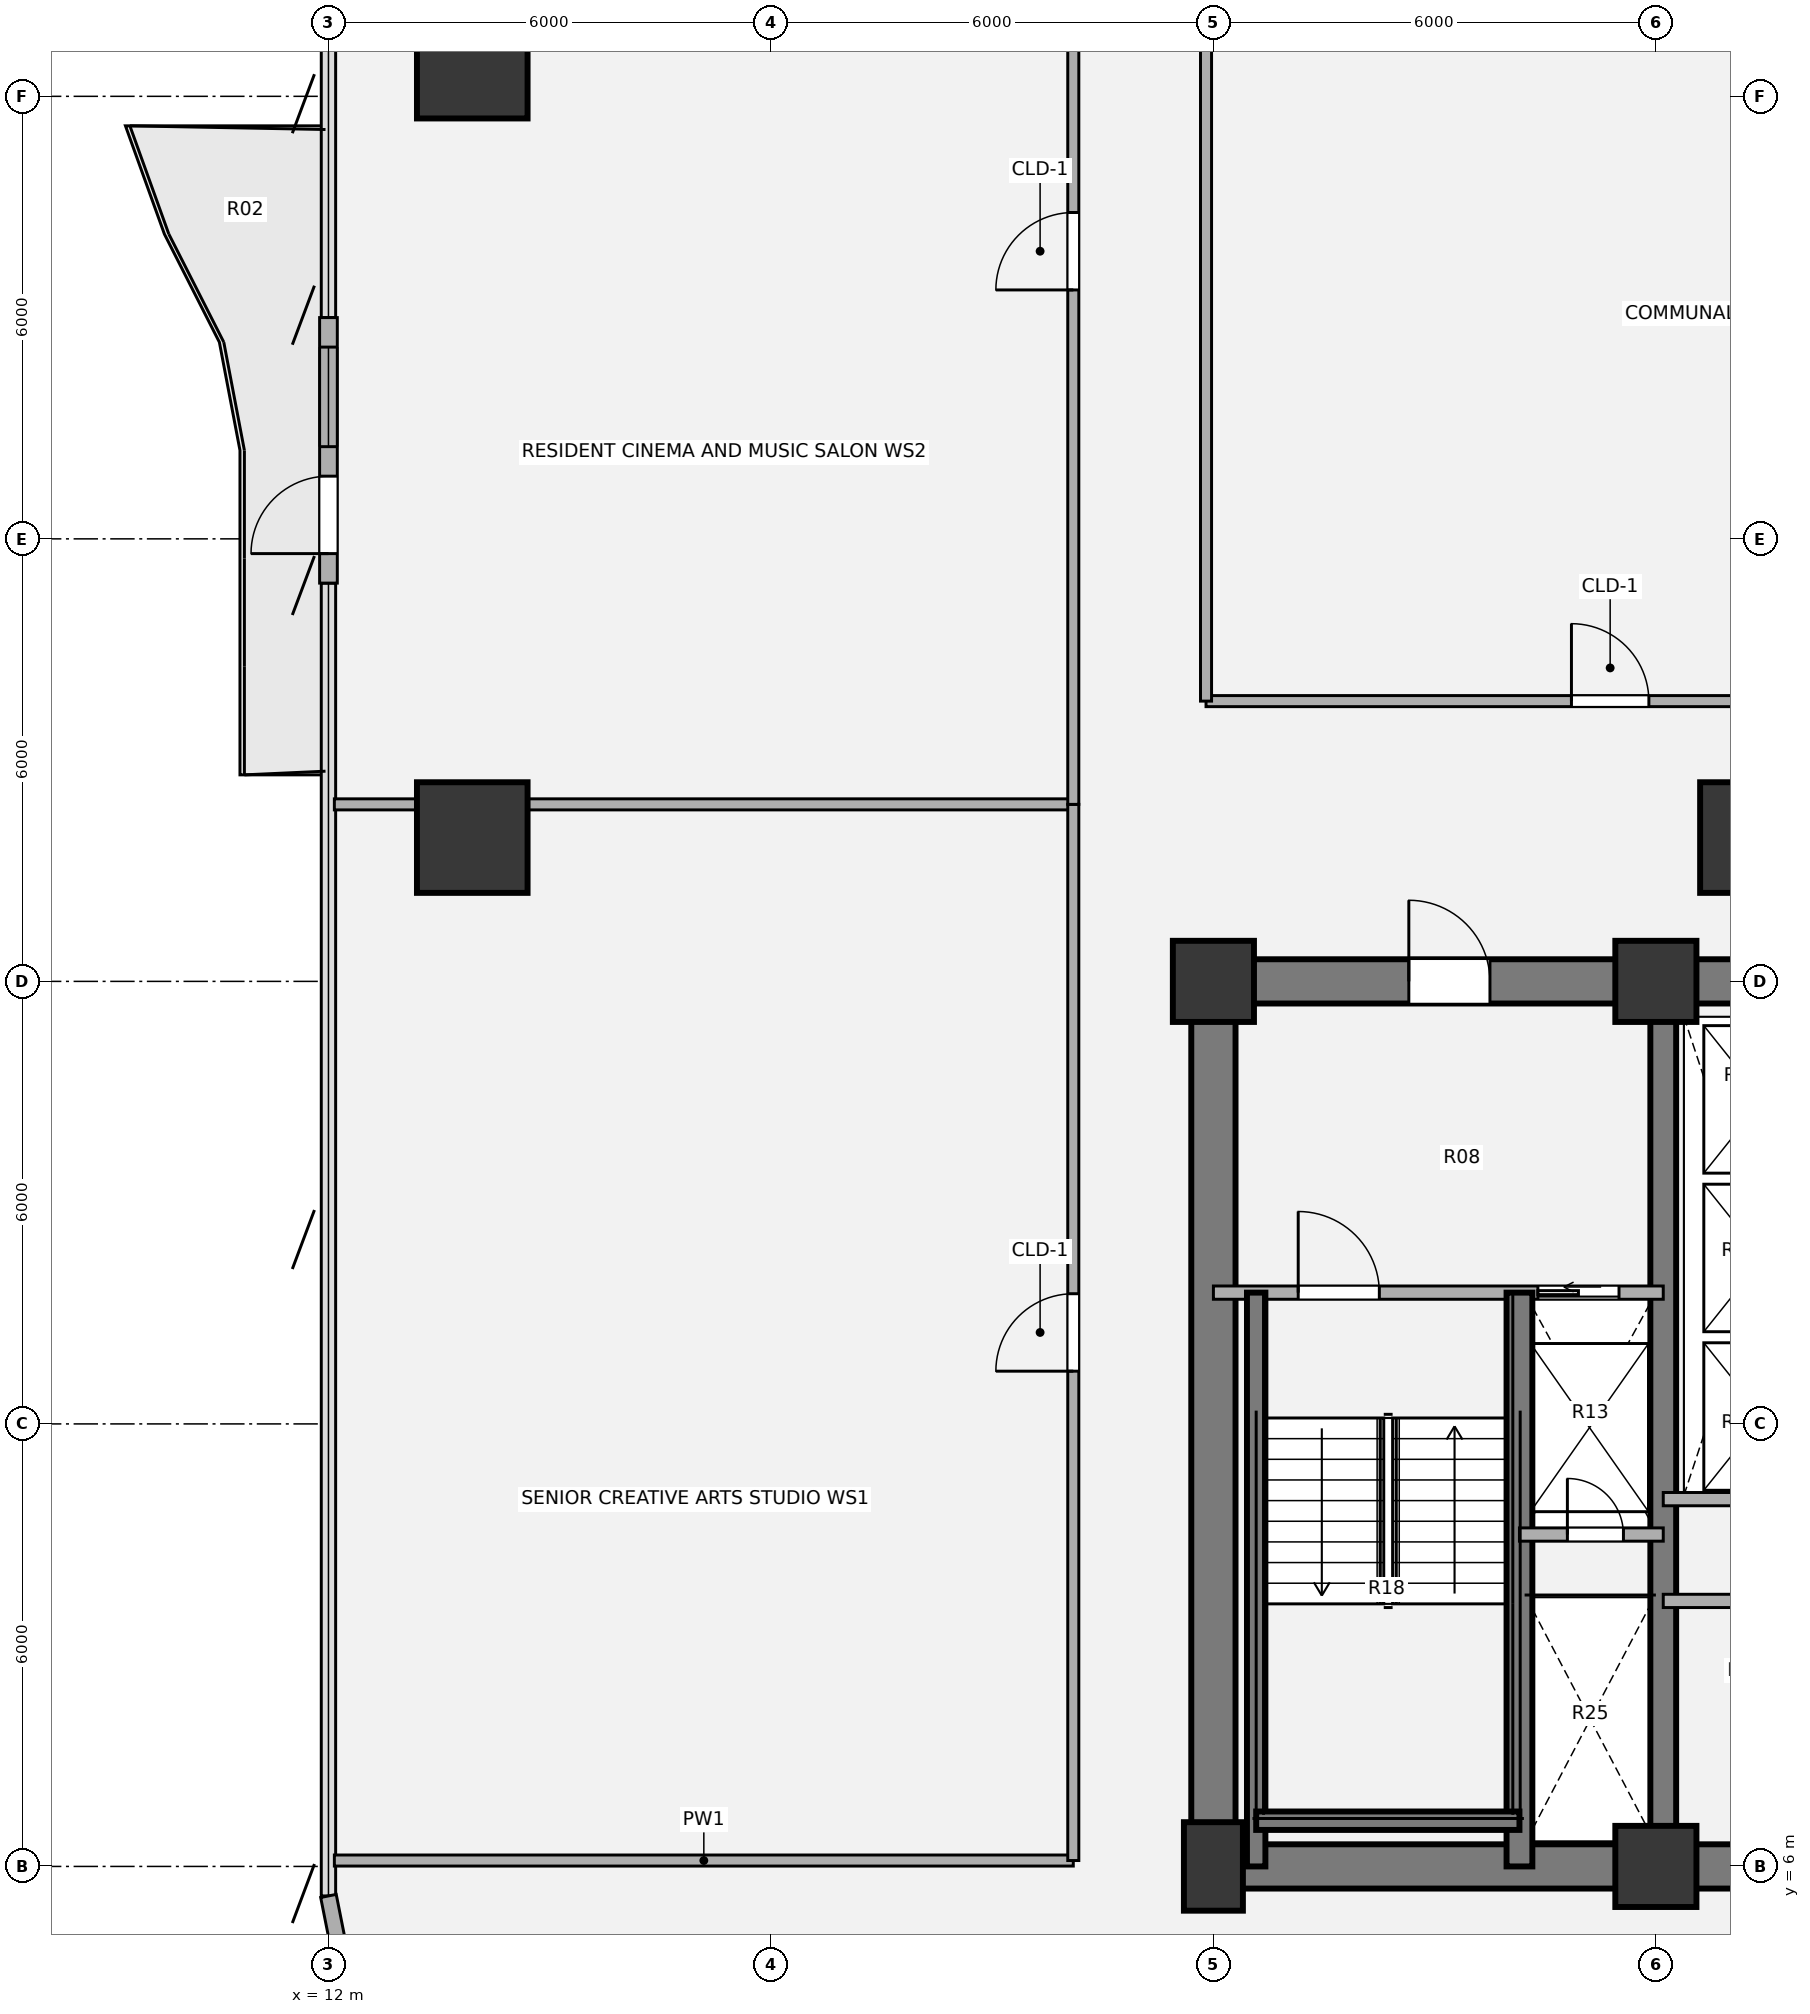
"""IFC4 building model, lengths in metres.
Left out: names, types, materials, properties, quantities, classifications, styles, units other than length and angle.
Written with IfcOpenShell. Run it as: python <this file> out.ifc"""

import sys

from ifc_helpers import new_model, si_unit, direction, frame, frame_2d, origin, origin_2d, place, context, subcontext, project, spatial, rectangle, hollow_circle, extrude, source, transform, mapped, element, fill, save


model = new_model("IFC4")
c1 = context("Model", 3, precision=1e-05, world=origin(), true_north=direction((0.0, 1.0)))
c2 = subcontext(c1, "Body", "Model", "MODEL_VIEW")
j1 = project(units=[si_unit("LENGTHUNIT", "METRE"), si_unit("PLANEANGLEUNIT", "RADIAN")], contexts=[c1])
p1 = place(None, origin())
s1 = spatial("IfcSite", under=j1, at=p1, CompositionType="ELEMENT")
p2 = place(p1, origin())
s2 = spatial("IfcBuilding", under=s1, at=p2, CompositionType="ELEMENT")
p3 = place(p2, frame((0.0, 0.0, 61.02)))
s3 = spatial("IfcBuildingStorey", under=s2, at=p3, CompositionType="ELEMENT", Elevation=61.02)
m1 = source(origin(), c2, "Body", "SweptSolid", [
    extrude(rectangle(XDim=0.8, YDim=1.2, at=origin_2d()), origin(), (0.0, 0.0, 1.0), 3.78),
])
p4 = place(p3, frame((24.0, 6.0, 0.0), z_axis=(0.0, 0.0, 1.0), x_axis=(1.0, 0.0, 0.0)))
e1 = element("IfcColumn", 1, at=p4, inside=s3, PredefinedType="COLUMN", context=c2, shape_type="MappedRepresentation", body=[
    mapped(m1, transform((0.0, 0.0, 0.0), x_axis=(1.0, 0.0, 0.0), y_axis=(0.0, 1.0, 0.0), z_axis=(0.0, 0.0, 1.0), scale=1.0)),
])
m2 = source(origin(), c2, "Body", "SweptSolid", [
    extrude(rectangle(XDim=1.1, YDim=1.1, at=origin_2d()), origin(), (0.0, 0.0, 1.0), 3.78),
])
for number, where, z_axis, x_axis in (
    (2, (30.0, 6.0, 0.0), (0.0, 0.0, 1.0), (1.0, 0.0, 0.0)),
    (3, (24.0, 18.0, 0.0), (0.0, 0.0, 1.0), (1.0, 0.0, 0.0)),
    (4, (30.0, 18.0, 0.0), (0.0, 0.0, 1.0), (1.0, 0.0, 0.0)),
):
    element("IfcColumn", number, at=place(p3, frame(where, z_axis=z_axis, x_axis=x_axis)), inside=s3, PredefinedType="COLUMN", context=c2, shape_type="MappedRepresentation", body=[
        mapped(m2, transform((0.0, 0.0, 0.0), x_axis=(1.0, 0.0, 0.0), y_axis=(0.0, 1.0, 0.0), z_axis=(0.0, 0.0, 1.0), scale=1.0)),
    ])
p5 = place(p3, frame((48.3, 6.0, 0.0), z_axis=(0.0, 0.0, 1.0), x_axis=(-1.0, 0.0, 0.0)))
e5 = element("IfcWall", 5, at=p5, inside=s3, PredefinedType="SHEAR", context=c2, shape_type="SweptSolid", body=[
    extrude(rectangle(XDim=24.6, YDim=0.6, at=frame_2d((12.3, 0.0))), origin(), (0.0, 0.0, 1.0), 3.78),
])
p6 = place(p3, frame((24.0, 6.0, 0.0), z_axis=(0.0, 0.0, 1.0), x_axis=(0.0, 1.0, 0.0)))
e6 = element("IfcWall", 6, at=p6, inside=s3, PredefinedType="SHEAR", context=c2, shape_type="SweptSolid", body=[
    extrude(rectangle(XDim=12.0, YDim=0.6, at=frame_2d((6.0, 0.0))), origin(), (0.0, 0.0, 1.0), 3.78),
])
p7 = place(p3, frame((23.7, 18.0, 0.0), z_axis=(0.0, 0.0, 1.0), x_axis=(1.0, 0.0, 0.0)))
e7 = element("IfcWall", 7, at=p7, inside=s3, PredefinedType="SHEAR", context=c2, shape_type="SweptSolid", body=[
    extrude(rectangle(XDim=9.5, YDim=0.6, at=frame_2d((4.75, 0.0))), origin(), (0.0, 0.0, 1.0), 3.78),
])
p8 = place(p7, frame((2.95, 0.0, 0.0)))
e8 = element("IfcOpeningElement", 8, at=p8, cuts=e7, PredefinedType="OPENING", context=c2, shape_type="SweptSolid", body=[
    extrude(rectangle(XDim=1.1, YDim=2.1, at=origin_2d()), frame((0.55, 0.31, 1.05), z_axis=(0.0, -1.0, 0.0), x_axis=(1.0, 0.0, 0.0)), (0.0, 0.0, 1.0), 0.62),
])
p9 = place(p3, frame((30.1, 6.0, 0.0), z_axis=(0.0, 0.0, 1.0), x_axis=(0.0, 1.0, 0.0)))
e9 = element("IfcWall", 9, at=p9, inside=s3, PredefinedType="SHEAR", context=c2, shape_type="SweptSolid", body=[
    extrude(rectangle(XDim=12.0, YDim=0.35, at=frame_2d((6.0, 0.0))), origin(), (0.0, 0.0, 1.0), 3.78),
])
m3 = source(origin(), c2, "Body", "SweptSolid", [
    extrude(hollow_circle(Radius=0.75, WallThickness=0.05, at=origin_2d()), origin(), (0.0, 0.0, 1.0), 3.78),
])
for number, where, z_axis, x_axis in (
    (10, (13.95, 19.95, 0.0), (0.0, 0.0, 1.0), (1.0, 0.0, 0.0)),
    (11, (13.95, 30.45, 0.0), (0.0, 0.0, 1.0), (1.0, 0.0, 0.0)),
    (12, (31.35, 19.95, 0.0), (0.0, 0.0, 1.0), (1.0, 0.0, 0.0)),
):
    element("IfcColumn", number, at=place(p3, frame(where, z_axis=z_axis, x_axis=x_axis)), inside=s3, PredefinedType="COLUMN", context=c2, shape_type="MappedRepresentation", body=[
        mapped(m3, transform((0.0, 0.0, 0.0), x_axis=(1.0, 0.0, 0.0), y_axis=(0.0, 1.0, 0.0), z_axis=(0.0, 0.0, 1.0), scale=1.0)),
    ])
p10 = place(p3, frame((12.244, 4.375, 0.0), z_axis=(0.0, 0.0, 1.0), x_axis=(-0.195138390419, 0.980775717779, 0.0)))
e13 = element("IfcWall", 13, at=p10, inside=s3, PredefinedType="SOLIDWALL", context=c2, shape_type="SweptSolid", body=[
    extrude(rectangle(XDim=1.249, YDim=0.215, at=frame_2d((0.624, 0.0))), origin(), (0.0, 0.0, 1.0), 3.53),
])
p11 = place(p3, frame((12.0, 23.4, 0.0), z_axis=(0.0, 0.0, 1.0), x_axis=(0.0, 1.0, 0.0)))
e14 = element("IfcWall", 14, at=p11, inside=s3, PredefinedType="SOLIDWALL", context=c2, shape_type="SweptSolid", body=[
    extrude(rectangle(XDim=3.6, YDim=0.24, at=frame_2d((1.8, 0.0))), origin(), (0.0, 0.0, 1.0), 3.53),
])
p12 = place(p11, frame((0.4, 0.0, 0.0)))
e15 = element("IfcOpeningElement", 15, at=p12, cuts=e14, PredefinedType="OPENING", context=c2, shape_type="SweptSolid", body=[
    extrude(rectangle(XDim=1.05, YDim=2.15, at=origin_2d()), frame((0.525, 0.13, 1.075), z_axis=(0.0, -1.0, 0.0), x_axis=(1.0, 0.0, 0.0)), (0.0, 0.0, 1.0), 0.26),
])
p13 = place(p11, frame((1.85, 0.0, 0.85)))
e16 = element("IfcOpeningElement", 16, at=p13, cuts=e14, PredefinedType="OPENING", context=c2, shape_type="SweptSolid", body=[
    extrude(rectangle(XDim=1.35, YDim=1.35, at=origin_2d()), frame((0.675, 0.13, 0.675), z_axis=(0.0, -1.0, 0.0), x_axis=(1.0, 0.0, 0.0)), (0.0, 0.0, 1.0), 0.26),
])
for number, where, z_axis, x_axis in (
    (17, (30.1, 10.98, 0.0), (0.0, 0.0, 1.0), (1.0, 0.0, 0.0)),
    (18, (30.1, 9.6, 0.0), (0.0, 0.0, 1.0), (1.0, 0.0, 0.0)),
):
    element("IfcWall", number, at=place(p3, frame(where, z_axis=z_axis, x_axis=x_axis)), inside=s3, PredefinedType="PARTITIONING", context=c2, shape_type="SweptSolid", body=[
        extrude(rectangle(XDim=2.5, YDim=0.18, at=frame_2d((1.25, 0.0))), origin(), (0.0, 0.0, 1.0), 3.5),
    ])
p14 = place(p3, frame((24.0, 13.78, 0.0), z_axis=(0.0, 0.0, 1.0), x_axis=(1.0, 0.0, 0.0)))
e19 = element("IfcWall", 19, at=p14, inside=s3, PredefinedType="PARTITIONING", context=c2, shape_type="SweptSolid", body=[
    extrude(rectangle(XDim=6.1, YDim=0.18, at=frame_2d((3.05, 0.0))), origin(), (0.0, 0.0, 1.0), 3.5),
])
p15 = place(p14, frame((1.15, 0.0, 0.0)))
e20 = element("IfcOpeningElement", 20, at=p15, cuts=e19, PredefinedType="OPENING", context=c2, shape_type="SweptSolid", body=[
    extrude(rectangle(XDim=1.1, YDim=2.1, at=origin_2d()), frame((0.55, 0.1, 1.05), z_axis=(0.0, -1.0, 0.0), x_axis=(1.0, 0.0, 0.0)), (0.0, 0.0, 1.0), 0.2),
])
p16 = place(p14, frame((4.4, 0.0, 0.0)))
e21 = element("IfcOpeningElement", 21, at=p16, cuts=e19, PredefinedType="OPENING", context=c2, shape_type="SweptSolid", body=[
    extrude(rectangle(XDim=1.1, YDim=2.1, at=origin_2d()), frame((0.55, 0.1, 1.05), z_axis=(0.0, -1.0, 0.0), x_axis=(1.0, 0.0, 0.0)), (0.0, 0.0, 1.0), 0.2),
])
p17 = place(p3, frame((28.15, 6.0, 0.0), z_axis=(0.0, 0.0, 1.0), x_axis=(0.0, 1.0, 0.0)))
e22 = element("IfcWall", 22, at=p17, inside=s3, PredefinedType="SHEAR", context=c2, shape_type="SweptSolid", body=[
    extrude(rectangle(XDim=7.78, YDim=0.35, at=frame_2d((3.89, 0.0))), origin(), (0.0, 0.0, 1.0), 3.85),
])
p18 = place(p3, frame((24.58, 6.0, 0.0), z_axis=(0.0, 0.0, 1.0), x_axis=(0.0, 1.0, 0.0)))
e23 = element("IfcWall", 23, at=p18, inside=s3, PredefinedType="SHEAR", context=c2, shape_type="SweptSolid", body=[
    extrude(rectangle(XDim=7.78, YDim=0.25, at=frame_2d((3.89, 0.0))), origin(), (0.0, 0.0, 1.0), 3.85),
])
p19 = place(p3, frame((24.58, 6.62, 0.0), z_axis=(0.0, 0.0, 1.0), x_axis=(1.0, 0.0, 0.0)))
e24 = element("IfcWall", 24, at=p19, inside=s3, PredefinedType="SHEAR", context=c2, shape_type="SweptSolid", body=[
    extrude(rectangle(XDim=3.57, YDim=0.25, at=frame_2d((1.785, 0.0))), origin(), (0.0, 0.0, 1.0), 3.85),
])
p20 = place(p3, frame((28.15, 10.5, 0.0), z_axis=(0.0, 0.0, 1.0), x_axis=(1.0, 0.0, 0.0)))
e25 = element("IfcWall", 25, at=p20, inside=s3, PredefinedType="PARTITIONING", context=c2, shape_type="SweptSolid", body=[
    extrude(rectangle(XDim=1.95, YDim=0.18, at=frame_2d((0.975, 0.0))), origin(), (0.0, 0.0, 1.0), 3.5),
])
p21 = place(p20, frame((0.65, 0.0, 0.0)))
e26 = element("IfcOpeningElement", 26, at=p21, cuts=e25, PredefinedType="OPENING", context=c2, shape_type="SweptSolid", body=[
    extrude(rectangle(XDim=0.76, YDim=2.05, at=origin_2d()), frame((0.38, 0.1, 1.025), z_axis=(0.0, -1.0, 0.0), x_axis=(1.0, 0.0, 0.0)), (0.0, 0.0, 1.0), 0.2),
])
p22 = place(p3, frame((12.08, 6.08, 0.0), z_axis=(0.0, 0.0, 1.0), x_axis=(1.0, 0.0, 0.0)))
e27 = element("IfcWall", 27, at=p22, inside=s3, PredefinedType="PARTITIONING", context=c2, shape_type="SweptSolid", body=[
    extrude(rectangle(XDim=10.02, YDim=0.15, at=frame_2d((5.01, 0.0))), origin(), (0.0, 0.0, 1.0), 3.5),
])
p23 = place(p3, frame((12.08, 20.4, 0.0), z_axis=(0.0, 0.0, 1.0), x_axis=(1.0, 0.0, 0.0)))
e28 = element("IfcWall", 28, at=p23, inside=s3, PredefinedType="PARTITIONING", context=c2, shape_type="SweptSolid", body=[
    extrude(rectangle(XDim=10.02, YDim=0.15, at=frame_2d((5.01, 0.0))), origin(), (0.0, 0.0, 1.0), 2.982),
])
p24 = place(p3, frame((23.9, 21.8, 0.0), z_axis=(0.0, 0.0, 1.0), x_axis=(1.0, 0.0, 0.0)))
e29 = element("IfcWall", 29, at=p24, inside=s3, PredefinedType="PARTITIONING", context=c2, shape_type="SweptSolid", body=[
    extrude(rectangle(XDim=13.7, YDim=0.15, at=frame_2d((6.85, 0.0))), origin(), (0.0, 0.0, 1.0), 2.982),
])
p25 = place(p24, frame((4.955, 0.0, 0.0)))
e30 = element("IfcOpeningElement", 30, at=p25, cuts=e29, PredefinedType="OPENING", context=c2, shape_type="SweptSolid", body=[
    extrude(rectangle(XDim=1.05, YDim=2.1, at=origin_2d()), frame((0.525, 0.085, 1.05), z_axis=(0.0, -1.0, 0.0), x_axis=(1.0, 0.0, 0.0)), (0.0, 0.0, 1.0), 0.17),
])
p26 = place(p3, frame((22.1, 6.08, 0.0), z_axis=(0.0, 0.0, 1.0), x_axis=(0.0, 1.0, 0.0)))
e31 = element("IfcWall", 31, at=p26, inside=s3, PredefinedType="PARTITIONING", context=c2, shape_type="SweptSolid", body=[
    extrude(rectangle(XDim=14.32, YDim=0.15, at=frame_2d((7.16, 0.0))), origin(), (0.0, 0.0, 1.0), 3.5),
])
p27 = place(p26, frame((6.635, 0.0, 0.0)))
e32 = element("IfcOpeningElement", 32, at=p27, cuts=e31, PredefinedType="OPENING", context=c2, shape_type="SweptSolid", body=[
    extrude(rectangle(XDim=1.05, YDim=2.1, at=origin_2d()), frame((0.525, 0.085, 1.05), z_axis=(0.0, -1.0, 0.0), x_axis=(1.0, 0.0, 0.0)), (0.0, 0.0, 1.0), 0.17),
])
p28 = place(p3, frame((22.1, 20.4, 0.0), z_axis=(0.0, 0.0, 1.0), x_axis=(0.0, 1.0, 0.0)))
e33 = element("IfcWall", 33, at=p28, inside=s3, PredefinedType="PARTITIONING", context=c2, shape_type="SweptSolid", body=[
    extrude(rectangle(XDim=15.521, YDim=0.15, at=frame_2d((7.76, 0.0))), origin(), (0.0, 0.0, 1.0), 3.5),
])
p29 = place(p28, frame((6.975, 0.0, 0.0)))
e34 = element("IfcOpeningElement", 34, at=p29, cuts=e33, PredefinedType="OPENING", context=c2, shape_type="SweptSolid", body=[
    extrude(rectangle(XDim=1.05, YDim=2.1, at=origin_2d()), frame((0.525, 0.085, 1.05), z_axis=(0.0, -1.0, 0.0), x_axis=(1.0, 0.0, 0.0)), (0.0, 0.0, 1.0), 0.17),
])
p30 = place(p3, frame((23.9, 21.8, 0.0), z_axis=(0.0, 0.0, 1.0), x_axis=(0.0, 1.0, 0.0)))
e35 = element("IfcWall", 35, at=p30, inside=s3, PredefinedType="PARTITIONING", context=c2, shape_type="SweptSolid", body=[
    extrude(rectangle(XDim=10.4, YDim=0.15, at=frame_2d((5.2, 0.0))), origin(), (0.0, 0.0, 1.0), 3.5),
])
m4 = source(origin(), c2, "Body", "SweptSolid", [
    extrude(rectangle(XDim=1.05, YDim=2.15, at=origin_2d()), frame((0.525, 0.025, 1.075), z_axis=(0.0, -1.0, 0.0), x_axis=(1.0, 0.0, 0.0)), (0.0, 0.0, 1.0), 0.05),
])
p31 = place(p12, origin())
e36 = element("IfcDoor", 36, at=p31, inside=s3, OperationType="SINGLE_SWING_LEFT", PredefinedType="DOOR", context=c2, shape_type="MappedRepresentation", body=[
    mapped(m4, transform((0.0, 0.0, 0.0), x_axis=(1.0, 0.0, 0.0), y_axis=(0.0, 1.0, 0.0), z_axis=(0.0, 0.0, 1.0), scale=1.0)),
])
fill(e15, e36)
m5 = source(origin(), c2, "Body", "SweptSolid", [
    extrude(rectangle(XDim=1.35, YDim=1.35, at=origin_2d()), frame((0.675, 0.03, 0.675), z_axis=(0.0, -1.0, 0.0), x_axis=(1.0, 0.0, 0.0)), (0.0, 0.0, 1.0), 0.06),
])
p32 = place(p13, origin())
e37 = element("IfcWindow", 37, at=p32, inside=s3, PartitioningType="SINGLE_PANEL", PredefinedType="WINDOW", context=c2, shape_type="MappedRepresentation", body=[
    mapped(m5, transform((0.0, 0.0, 0.0), x_axis=(1.0, 0.0, 0.0), y_axis=(0.0, 1.0, 0.0), z_axis=(0.0, 0.0, 1.0), scale=1.0)),
])
fill(e16, e37)
m6 = source(origin(), c2, "Body", "SweptSolid", [
    extrude(rectangle(XDim=1.1, YDim=2.1, at=origin_2d()), frame((0.55, 0.025, 1.05), z_axis=(0.0, -1.0, 0.0), x_axis=(1.0, 0.0, 0.0)), (0.0, 0.0, 1.0), 0.05),
])
p33 = place(p15, origin())
e38 = element("IfcDoor", 38, at=p33, inside=s3, OperationType="SINGLE_SWING_LEFT", PredefinedType="DOOR", context=c2, shape_type="MappedRepresentation", body=[
    mapped(m6, transform((0.0, 0.0, 0.0), x_axis=(1.0, 0.0, 0.0), y_axis=(0.0, 1.0, 0.0), z_axis=(0.0, 0.0, 1.0), scale=1.0)),
])
fill(e20, e38)
m7 = source(origin(), c2, "Body", "SweptSolid", [
    extrude(rectangle(XDim=1.1, YDim=2.1, at=origin_2d()), frame((0.55, 0.025, 1.05), z_axis=(0.0, -1.0, 0.0), x_axis=(1.0, 0.0, 0.0)), (0.0, 0.0, 1.0), 0.05),
])
p34 = place(p16, origin())
e39 = element("IfcDoor", 39, at=p34, inside=s3, OperationType="SLIDING_TO_LEFT", PredefinedType="DOOR", context=c2, shape_type="MappedRepresentation", body=[
    mapped(m7, transform((0.0, 0.0, 0.0), x_axis=(1.0, 0.0, 0.0), y_axis=(0.0, 1.0, 0.0), z_axis=(0.0, 0.0, 1.0), scale=1.0)),
])
fill(e21, e39)
m8 = source(origin(), c2, "Body", "SweptSolid", [
    extrude(rectangle(XDim=0.76, YDim=2.05, at=origin_2d()), frame((0.38, 0.025, 1.025), z_axis=(0.0, -1.0, 0.0), x_axis=(1.0, 0.0, 0.0)), (0.0, 0.0, 1.0), 0.05),
])
p35 = place(p21, origin())
e40 = element("IfcDoor", 40, at=p35, inside=s3, OperationType="SINGLE_SWING_LEFT", PredefinedType="DOOR", context=c2, shape_type="MappedRepresentation", body=[
    mapped(m8, transform((0.0, 0.0, 0.0), x_axis=(1.0, 0.0, 0.0), y_axis=(0.0, 1.0, 0.0), z_axis=(0.0, 0.0, 1.0), scale=1.0)),
])
fill(e26, e40)
m9 = source(origin(), c2, "Body", "SweptSolid", [
    extrude(rectangle(XDim=1.1, YDim=2.1, at=origin_2d()), frame((0.55, 0.025, 1.05), z_axis=(0.0, -1.0, 0.0), x_axis=(1.0, 0.0, 0.0)), (0.0, 0.0, 1.0), 0.05),
])
p36 = place(p8, origin())
e41 = element("IfcDoor", 41, at=p36, inside=s3, OperationType="SINGLE_SWING_LEFT", PredefinedType="DOOR", context=c2, shape_type="MappedRepresentation", body=[
    mapped(m9, transform((0.0, 0.0, 0.0), x_axis=(1.0, 0.0, 0.0), y_axis=(0.0, 1.0, 0.0), z_axis=(0.0, 0.0, 1.0), scale=1.0)),
])
fill(e8, e41)
m10 = source(origin(), c2, "Body", "SweptSolid", [
    extrude(rectangle(XDim=1.05, YDim=2.1, at=origin_2d()), frame((0.525, 0.025, 1.05), z_axis=(0.0, -1.0, 0.0), x_axis=(1.0, 0.0, 0.0)), (0.0, 0.0, 1.0), 0.05),
])
p37 = place(p25, origin())
e42 = element("IfcDoor", 42, at=p37, inside=s3, OperationType="SINGLE_SWING_LEFT", PredefinedType="DOOR", context=c2, shape_type="MappedRepresentation", body=[
    mapped(m10, transform((0.0, 0.0, 0.0), x_axis=(1.0, 0.0, 0.0), y_axis=(0.0, 1.0, 0.0), z_axis=(0.0, 0.0, 1.0), scale=1.0)),
])
fill(e30, e42)
p38 = place(p27, origin())
e43 = element("IfcDoor", 43, at=p38, inside=s3, OperationType="SINGLE_SWING_LEFT", PredefinedType="DOOR", context=c2, shape_type="MappedRepresentation", body=[
    mapped(m10, transform((0.0, 0.0, 0.0), x_axis=(1.0, 0.0, 0.0), y_axis=(0.0, 1.0, 0.0), z_axis=(0.0, 0.0, 1.0), scale=1.0)),
])
fill(e32, e43)
p39 = place(p29, origin())
e44 = element("IfcDoor", 44, at=p39, inside=s3, OperationType="SINGLE_SWING_LEFT", PredefinedType="DOOR", context=c2, shape_type="MappedRepresentation", body=[
    mapped(m10, transform((0.0, 0.0, 0.0), x_axis=(1.0, 0.0, 0.0), y_axis=(0.0, 1.0, 0.0), z_axis=(0.0, 0.0, 1.0), scale=1.0)),
])
fill(e34, e44)
save(model, sys.argv[1])
